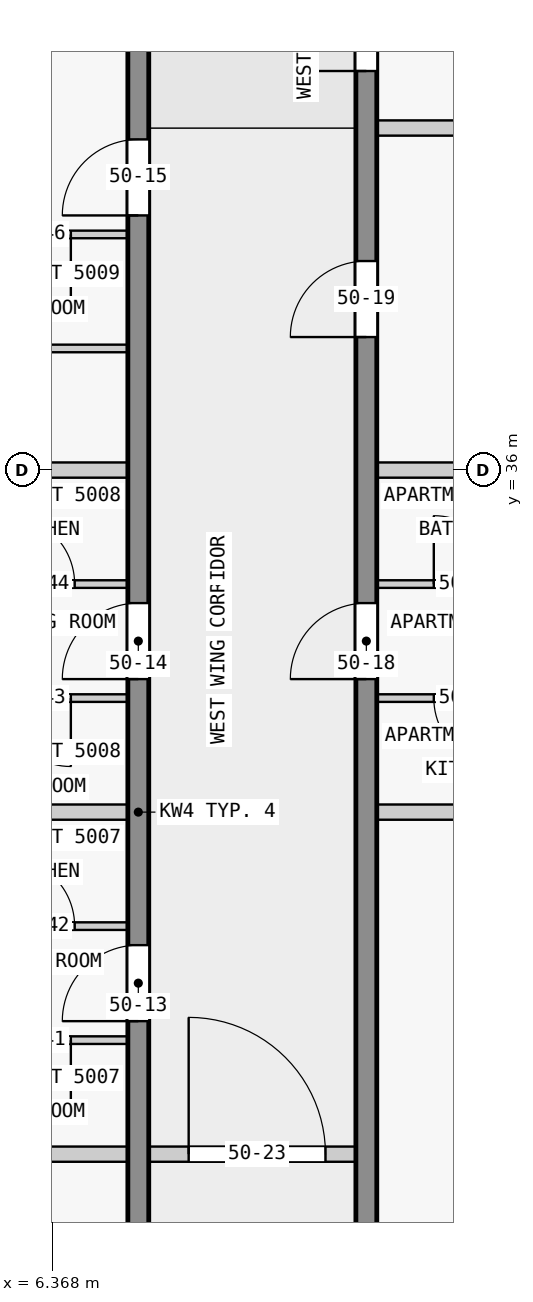
"""IFC4 building model, lengths in metres.
Left out: names, types, materials, properties, quantities, classifications, styles, units other than length and angle.
Written with IfcOpenShell. Run it as: python <this file> out.ifc"""

import sys

from ifc_helpers import new_model, si_unit, direction, frame, frame_2d, origin, place, context, subcontext, project, spatial, rectangle, extrude, element, fill, save


model = new_model("IFC4")
c1 = context("Model", 3, precision=1e-05, world=origin(), true_north=direction((0.0, 1.0)))
c2 = subcontext(c1, "Body", "Model", "MODEL_VIEW")
j1 = project(units=[si_unit("LENGTHUNIT", "METRE"), si_unit("PLANEANGLEUNIT", "RADIAN")], contexts=[c1])
p1 = place(None, origin())
s1 = spatial("IfcSite", under=j1, at=p1, CompositionType="ELEMENT")
p2 = place(p1, origin())
s2 = spatial("IfcBuilding", under=s1, at=p2, CompositionType="ELEMENT")
p3 = place(p2, frame((0.0, 0.0, 194.4)))
s3 = spatial("IfcBuildingStorey", under=s2, at=p3, CompositionType="ELEMENT", Elevation=194.4)
p4 = place(p3, frame((7.5, 18.0, 0.0), z_axis=(0.0, 0.0, 1.0), x_axis=(0.0, 1.0, 0.0)))
e1 = element("IfcWall", 1, at=p4, inside=s3, PredefinedType="SHEAR", context=c2, shape_type="SweptSolid", body=[
    extrude(rectangle(XDim=27.0, YDim=0.275, at=frame_2d((13.5, 0.0))), origin(), (0.0, 0.0, 1.0), 3.25),
])
p5 = place(p4, frame((1.75, 0.0, 0.0)))
e2 = element("IfcOpeningElement", 2, at=p5, cuts=e1, PredefinedType="OPENING", context=c2, shape_type="SweptSolid", body=[
    extrude(rectangle(XDim=1.0, YDim=2.1, at=frame_2d((0.5, 1.05))), frame((0.0, 0.147, 0.0), z_axis=(0.0, -1.0, 0.0), x_axis=(1.0, 0.0, 0.0)), (0.0, 0.0, 1.0), 0.295),
])
p6 = place(p4, frame((5.85, 0.0, 0.0)))
e3 = element("IfcOpeningElement", 3, at=p6, cuts=e1, PredefinedType="OPENING", context=c2, shape_type="SweptSolid", body=[
    extrude(rectangle(XDim=1.8, YDim=2.1, at=frame_2d((0.9, 1.05))), frame((0.0, 0.147, 0.0), z_axis=(0.0, -1.0, 0.0), x_axis=(1.0, 0.0, 0.0)), (0.0, 0.0, 1.0), 0.295),
])
p7 = place(p4, frame((10.75, 0.0, 0.0)))
e4 = element("IfcOpeningElement", 4, at=p7, cuts=e1, PredefinedType="OPENING", context=c2, shape_type="SweptSolid", body=[
    extrude(rectangle(XDim=1.0, YDim=2.1, at=frame_2d((0.5, 1.05))), frame((0.0, 0.147, 0.0), z_axis=(0.0, -1.0, 0.0), x_axis=(1.0, 0.0, 0.0)), (0.0, 0.0, 1.0), 0.295),
])
p8 = place(p4, frame((15.25, 0.0, 0.0)))
e5 = element("IfcOpeningElement", 5, at=p8, cuts=e1, PredefinedType="OPENING", context=c2, shape_type="SweptSolid", body=[
    extrude(rectangle(XDim=1.0, YDim=2.1, at=frame_2d((0.5, 1.05))), frame((0.0, 0.147, 0.0), z_axis=(0.0, -1.0, 0.0), x_axis=(1.0, 0.0, 0.0)), (0.0, 0.0, 1.0), 0.295),
])
p9 = place(p4, frame((21.35, 0.0, 0.0)))
e6 = element("IfcOpeningElement", 6, at=p9, cuts=e1, PredefinedType="OPENING", context=c2, shape_type="SweptSolid", body=[
    extrude(rectangle(XDim=1.0, YDim=2.1, at=frame_2d((0.5, 1.05))), frame((0.0, 0.147, 0.0), z_axis=(0.0, -1.0, 0.0), x_axis=(1.0, 0.0, 0.0)), (0.0, 0.0, 1.0), 0.295),
])
p10 = place(p3, frame((10.5, 18.0, 0.0), z_axis=(0.0, 0.0, 1.0), x_axis=(0.0, 1.0, 0.0)))
e7 = element("IfcWall", 7, at=p10, inside=s3, PredefinedType="SHEAR", context=c2, shape_type="SweptSolid", body=[
    extrude(rectangle(XDim=27.0, YDim=0.275, at=frame_2d((13.5, 0.0))), origin(), (0.0, 0.0, 1.0), 3.25),
])
p11 = place(p10, frame((1.75, 0.0, 0.0)))
e8 = element("IfcOpeningElement", 8, at=p11, cuts=e7, PredefinedType="OPENING", context=c2, shape_type="SweptSolid", body=[
    extrude(rectangle(XDim=1.0, YDim=2.1, at=frame_2d((0.5, 1.05))), frame((0.0, 0.147, 0.0), z_axis=(0.0, -1.0, 0.0), x_axis=(1.0, 0.0, 0.0)), (0.0, 0.0, 1.0), 0.295),
])
p12 = place(p10, frame((6.25, 0.0, 0.0)))
e9 = element("IfcOpeningElement", 9, at=p12, cuts=e7, PredefinedType="OPENING", context=c2, shape_type="SweptSolid", body=[
    extrude(rectangle(XDim=1.0, YDim=2.1, at=frame_2d((0.5, 1.05))), frame((0.0, 0.147, 0.0), z_axis=(0.0, -1.0, 0.0), x_axis=(1.0, 0.0, 0.0)), (0.0, 0.0, 1.0), 0.295),
])
p13 = place(p10, frame((15.25, 0.0, 0.0)))
e10 = element("IfcOpeningElement", 10, at=p13, cuts=e7, PredefinedType="OPENING", context=c2, shape_type="SweptSolid", body=[
    extrude(rectangle(XDim=1.0, YDim=2.1, at=frame_2d((0.5, 1.05))), frame((0.0, 0.147, 0.0), z_axis=(0.0, -1.0, 0.0), x_axis=(1.0, 0.0, 0.0)), (0.0, 0.0, 1.0), 0.295),
])
p14 = place(p10, frame((19.75, 0.0, 0.0)))
e11 = element("IfcOpeningElement", 11, at=p14, cuts=e7, PredefinedType="OPENING", context=c2, shape_type="SweptSolid", body=[
    extrude(rectangle(XDim=1.0, YDim=2.1, at=frame_2d((0.5, 1.05))), frame((0.0, 0.147, 0.0), z_axis=(0.0, -1.0, 0.0), x_axis=(1.0, 0.0, 0.0)), (0.0, 0.0, 1.0), 0.295),
])
p15 = place(p10, frame((23.25, 0.0, 0.0)))
e12 = element("IfcOpeningElement", 12, at=p15, cuts=e7, PredefinedType="OPENING", context=c2, shape_type="SweptSolid", body=[
    extrude(rectangle(XDim=0.9, YDim=2.1, at=frame_2d((0.45, 1.05))), frame((0.0, 0.147, 0.0), z_axis=(0.0, -1.0, 0.0), x_axis=(1.0, 0.0, 0.0)), (0.0, 0.0, 1.0), 0.295),
])
p16 = place(p10, frame((25.45, 0.0, 0.0)))
e13 = element("IfcOpeningElement", 13, at=p16, cuts=e7, PredefinedType="OPENING", context=c2, shape_type="SweptSolid", body=[
    extrude(rectangle(XDim=1.0, YDim=2.1, at=frame_2d((0.5, 1.05))), frame((0.0, 0.147, 0.0), z_axis=(0.0, -1.0, 0.0), x_axis=(1.0, 0.0, 0.0)), (0.0, 0.0, 1.0), 0.295),
])
p17 = place(p3, frame((7.363, 27.0, 0.0), z_axis=(0.0, 0.0, 1.0), x_axis=(-1.0, 0.0, 0.0)))
e14 = element("IfcWall", 14, at=p17, inside=s3, PredefinedType="PARTITIONING", context=c2, shape_type="SweptSolid", body=[
    extrude(rectangle(XDim=7.443, YDim=0.2, at=frame_2d((3.721, 0.0))), origin(), (0.0, 0.0, 1.0), 3.25),
])
p18 = place(p3, frame((7.363, 28.5, 0.0), z_axis=(0.0, 0.0, 1.0), x_axis=(-1.0, 0.0, 0.0)))
e15 = element("IfcWall", 15, at=p18, inside=s3, PredefinedType="PARTITIONING", context=c2, shape_type="SweptSolid", body=[
    extrude(rectangle(XDim=2.4, YDim=0.1, at=frame_2d((1.2, 0.0))), origin(), (0.0, 0.0, 1.0), 3.25),
])
p19 = place(p18, frame((0.75, 0.0, 0.0)))
e16 = element("IfcOpeningElement", 16, at=p19, cuts=e15, PredefinedType="OPENING", context=c2, shape_type="SweptSolid", body=[
    extrude(rectangle(XDim=0.9, YDim=2.1, at=frame_2d((0.45, 1.05))), frame((0.0, 0.06, 0.0), z_axis=(0.0, -1.0, 0.0), x_axis=(1.0, 0.0, 0.0)), (0.0, 0.0, 1.0), 0.12),
])
p20 = place(p3, frame((5.012, 30.0, 0.0), z_axis=(0.0, 0.0, 1.0), x_axis=(1.0, 0.0, 0.0)))
e17 = element("IfcWall", 17, at=p20, inside=s3, PredefinedType="PARTITIONING", context=c2, shape_type="SweptSolid", body=[
    extrude(rectangle(XDim=2.35, YDim=0.1, at=frame_2d((1.175, 0.0))), origin(), (0.0, 0.0, 1.0), 3.25),
])
p21 = place(p20, frame((0.75, 0.0, 0.0)))
e18 = element("IfcOpeningElement", 18, at=p21, cuts=e17, PredefinedType="OPENING", context=c2, shape_type="SweptSolid", body=[
    extrude(rectangle(XDim=0.9, YDim=2.1, at=frame_2d((0.45, 1.05))), frame((0.0, 0.06, 0.0), z_axis=(0.0, -1.0, 0.0), x_axis=(1.0, 0.0, 0.0)), (0.0, 0.0, 1.0), 0.12),
])
p22 = place(p3, frame((7.363, 31.5, 0.0), z_axis=(0.0, 0.0, 1.0), x_axis=(-1.0, 0.0, 0.0)))
e19 = element("IfcWall", 19, at=p22, inside=s3, PredefinedType="PARTITIONING", context=c2, shape_type="SweptSolid", body=[
    extrude(rectangle(XDim=2.3, YDim=0.2, at=frame_2d((1.15, 0.0))), origin(), (0.0, 0.0, 1.0), 3.25),
])
p23 = place(p3, frame((17.85, 31.5, 0.0), z_axis=(0.0, 0.0, 1.0), x_axis=(-1.0, 0.0, 0.0)))
e20 = element("IfcWall", 20, at=p23, inside=s3, PredefinedType="PARTITIONING", context=c2, shape_type="SweptSolid", body=[
    extrude(rectangle(XDim=7.213, YDim=0.2, at=frame_2d((3.606, 0.0))), origin(), (0.0, 0.0, 1.0), 3.25),
])
p24 = place(p3, frame((7.363, 33.0, 0.0), z_axis=(0.0, 0.0, 1.0), x_axis=(-1.0, 0.0, 0.0)))
e21 = element("IfcWall", 21, at=p24, inside=s3, PredefinedType="PARTITIONING", context=c2, shape_type="SweptSolid", body=[
    extrude(rectangle(XDim=2.35, YDim=0.1, at=frame_2d((1.175, 0.0))), origin(), (0.0, 0.0, 1.0), 3.25),
])
p25 = place(p24, frame((0.75, 0.0, 0.0)))
e22 = element("IfcOpeningElement", 22, at=p25, cuts=e21, PredefinedType="OPENING", context=c2, shape_type="SweptSolid", body=[
    extrude(rectangle(XDim=0.9, YDim=2.1, at=frame_2d((0.45, 1.05))), frame((0.0, 0.06, 0.0), z_axis=(0.0, -1.0, 0.0), x_axis=(1.0, 0.0, 0.0)), (0.0, 0.0, 1.0), 0.12),
])
p26 = place(p3, frame((13.038, 33.0, 0.0), z_axis=(0.0, 0.0, 1.0), x_axis=(-1.0, 0.0, 0.0)))
e23 = element("IfcWall", 23, at=p26, inside=s3, PredefinedType="PARTITIONING", context=c2, shape_type="SweptSolid", body=[
    extrude(rectangle(XDim=2.4, YDim=0.1, at=frame_2d((1.2, 0.0))), origin(), (0.0, 0.0, 1.0), 3.25),
])
p27 = place(p26, frame((0.75, 0.0, 0.0)))
e24 = element("IfcOpeningElement", 24, at=p27, cuts=e23, PredefinedType="OPENING", context=c2, shape_type="SweptSolid", body=[
    extrude(rectangle(XDim=0.9, YDim=2.1, at=frame_2d((0.45, 1.05))), frame((0.0, 0.06, 0.0), z_axis=(0.0, -1.0, 0.0), x_axis=(1.0, 0.0, 0.0)), (0.0, 0.0, 1.0), 0.12),
])
p28 = place(p3, frame((5.012, 34.5, 0.0), z_axis=(0.0, 0.0, 1.0), x_axis=(1.0, 0.0, 0.0)))
e25 = element("IfcWall", 25, at=p28, inside=s3, PredefinedType="PARTITIONING", context=c2, shape_type="SweptSolid", body=[
    extrude(rectangle(XDim=2.35, YDim=0.1, at=frame_2d((1.175, 0.0))), origin(), (0.0, 0.0, 1.0), 3.25),
])
p29 = place(p28, frame((0.75, 0.0, 0.0)))
e26 = element("IfcOpeningElement", 26, at=p29, cuts=e25, PredefinedType="OPENING", context=c2, shape_type="SweptSolid", body=[
    extrude(rectangle(XDim=0.9, YDim=2.1, at=frame_2d((0.45, 1.05))), frame((0.0, 0.06, 0.0), z_axis=(0.0, -1.0, 0.0), x_axis=(1.0, 0.0, 0.0)), (0.0, 0.0, 1.0), 0.12),
])
p30 = place(p3, frame((10.637, 34.5, 0.0), z_axis=(0.0, 0.0, 1.0), x_axis=(1.0, 0.0, 0.0)))
e27 = element("IfcWall", 27, at=p30, inside=s3, PredefinedType="PARTITIONING", context=c2, shape_type="SweptSolid", body=[
    extrude(rectangle(XDim=2.4, YDim=0.1, at=frame_2d((1.2, 0.0))), origin(), (0.0, 0.0, 1.0), 3.25),
])
p31 = place(p30, frame((0.75, 0.0, 0.0)))
e28 = element("IfcOpeningElement", 28, at=p31, cuts=e27, PredefinedType="OPENING", context=c2, shape_type="SweptSolid", body=[
    extrude(rectangle(XDim=0.9, YDim=2.1, at=frame_2d((0.45, 1.05))), frame((0.0, 0.06, 0.0), z_axis=(0.0, -1.0, 0.0), x_axis=(1.0, 0.0, 0.0)), (0.0, 0.0, 1.0), 0.12),
])
for number, where, z_axis, x_axis in (
    (29, (7.363, 36.0, 0.0), (0.0, 0.0, 1.0), (-1.0, 0.0, 0.0)),
    (30, (12.938, 36.0, 0.0), (0.0, 0.0, 1.0), (-1.0, 0.0, 0.0)),
):
    element("IfcWall", number, at=place(p3, frame(where, z_axis=z_axis, x_axis=x_axis)), inside=s3, PredefinedType="PARTITIONING", context=c2, shape_type="SweptSolid", body=[
        extrude(rectangle(XDim=2.3, YDim=0.2, at=frame_2d((1.15, 0.0))), origin(), (0.0, 0.0, 1.0), 3.25),
    ])
p32 = place(p3, frame((7.363, 37.6, 0.0), z_axis=(0.0, 0.0, 1.0), x_axis=(-1.0, 0.0, 0.0)))
e31 = element("IfcWall", 31, at=p32, inside=s3, PredefinedType="PARTITIONING", context=c2, shape_type="SweptSolid", body=[
    extrude(rectangle(XDim=2.35, YDim=0.1, at=frame_2d((1.175, 0.0))), origin(), (0.0, 0.0, 1.0), 3.25),
])
p33 = place(p3, frame((7.363, 39.1, 0.0), z_axis=(0.0, 0.0, 1.0), x_axis=(-1.0, 0.0, 0.0)))
e32 = element("IfcWall", 32, at=p33, inside=s3, PredefinedType="PARTITIONING", context=c2, shape_type="SweptSolid", body=[
    extrude(rectangle(XDim=2.35, YDim=0.1, at=frame_2d((1.175, 0.0))), origin(), (0.0, 0.0, 1.0), 3.25),
])
p34 = place(p33, frame((0.75, 0.0, 0.0)))
e33 = element("IfcOpeningElement", 33, at=p34, cuts=e32, PredefinedType="OPENING", context=c2, shape_type="SweptSolid", body=[
    extrude(rectangle(XDim=0.9, YDim=2.1, at=frame_2d((0.45, 1.05))), frame((0.0, 0.06, 0.0), z_axis=(0.0, -1.0, 0.0), x_axis=(1.0, 0.0, 0.0)), (0.0, 0.0, 1.0), 0.12),
])
p35 = place(p3, frame((18.08, 40.5, 0.0), z_axis=(0.0, 0.0, 1.0), x_axis=(-1.0, 0.0, 0.0)))
e34 = element("IfcWall", 34, at=p35, inside=s3, PredefinedType="PARTITIONING", context=c2, shape_type="SweptSolid", body=[
    extrude(rectangle(XDim=7.443, YDim=0.2, at=frame_2d((3.721, 0.0))), origin(), (0.0, 0.0, 1.0), 3.25),
])
p36 = place(p3, frame((7.462, 27.0, 0.0), z_axis=(0.0, 0.0, 1.0), x_axis=(1.0, 0.0, 0.0)))
e35 = element("IfcWall", 35, at=p36, inside=s3, PredefinedType="PARTITIONING", context=c2, shape_type="SweptSolid", body=[
    extrude(rectangle(XDim=3.175, YDim=0.2, at=frame_2d((1.587, 0.0))), origin(), (0.0, 0.0, 1.0), 3.25),
])
p37 = place(p36, frame((0.7, 0.0, 0.0)))
e36 = element("IfcOpeningElement", 36, at=p37, cuts=e35, PredefinedType="OPENING", context=c2, shape_type="SweptSolid", body=[
    extrude(rectangle(XDim=1.8, YDim=2.1, at=frame_2d((0.9, 1.05))), frame((0.0, 0.11, 0.0), z_axis=(0.0, -1.0, 0.0), x_axis=(1.0, 0.0, 0.0)), (0.0, 0.0, 1.0), 0.22),
])
p38 = place(p7, origin())
e37 = element("IfcDoor", 37, at=p38, inside=s3, OperationType="SINGLE_SWING_LEFT", PredefinedType="DOOR", context=c2, shape_type="SweptSolid", body=[
    extrude(rectangle(XDim=1.0, YDim=2.1, at=frame_2d((0.5, 1.05))), frame((0.0, 0.025, 0.0), z_axis=(0.0, -1.0, 0.0), x_axis=(1.0, 0.0, 0.0)), (0.0, 0.0, 1.0), 0.05),
])
fill(e4, e37)
p39 = place(p8, origin())
e38 = element("IfcDoor", 38, at=p39, inside=s3, OperationType="SINGLE_SWING_RIGHT", PredefinedType="DOOR", context=c2, shape_type="SweptSolid", body=[
    extrude(rectangle(XDim=1.0, YDim=2.1, at=frame_2d((0.5, 1.05))), frame((0.0, 0.025, 0.0), z_axis=(0.0, -1.0, 0.0), x_axis=(1.0, 0.0, 0.0)), (0.0, 0.0, 1.0), 0.05),
])
fill(e5, e38)
p40 = place(p9, origin())
e39 = element("IfcDoor", 39, at=p40, inside=s3, OperationType="SINGLE_SWING_RIGHT", PredefinedType="DOOR", context=c2, shape_type="SweptSolid", body=[
    extrude(rectangle(XDim=1.0, YDim=2.1, at=frame_2d((0.5, 1.05))), frame((0.0, 0.025, 0.0), z_axis=(0.0, -1.0, 0.0), x_axis=(1.0, 0.0, 0.0)), (0.0, 0.0, 1.0), 0.05),
])
fill(e6, e39)
p41 = place(p13, origin())
e40 = element("IfcDoor", 40, at=p41, inside=s3, OperationType="SINGLE_SWING_RIGHT", PredefinedType="DOOR", context=c2, shape_type="SweptSolid", body=[
    extrude(rectangle(XDim=1.0, YDim=2.1, at=frame_2d((0.5, 1.05))), frame((0.0, 0.025, 0.0), z_axis=(0.0, -1.0, 0.0), x_axis=(1.0, 0.0, 0.0)), (0.0, 0.0, 1.0), 0.05),
])
fill(e10, e40)
p42 = place(p14, origin())
e41 = element("IfcDoor", 41, at=p42, inside=s3, OperationType="SINGLE_SWING_RIGHT", PredefinedType="DOOR", context=c2, shape_type="SweptSolid", body=[
    extrude(rectangle(XDim=1.0, YDim=2.1, at=frame_2d((0.5, 1.05))), frame((0.0, 0.025, 0.0), z_axis=(0.0, -1.0, 0.0), x_axis=(1.0, 0.0, 0.0)), (0.0, 0.0, 1.0), 0.05),
])
fill(e11, e41)
p43 = place(p15, origin())
e42 = element("IfcDoor", 42, at=p43, inside=s3, OperationType="SINGLE_SWING_RIGHT", PredefinedType="DOOR", context=c2, shape_type="SweptSolid", body=[
    extrude(rectangle(XDim=0.9, YDim=2.1, at=frame_2d((0.45, 1.05))), frame((0.0, 0.025, 0.0), z_axis=(0.0, -1.0, 0.0), x_axis=(1.0, 0.0, 0.0)), (0.0, 0.0, 1.0), 0.05),
])
fill(e12, e42)
p44 = place(p37, origin())
e43 = element("IfcDoor", 43, at=p44, inside=s3, OperationType="SINGLE_SWING_RIGHT", PredefinedType="DOOR", context=c2, shape_type="SweptSolid", body=[
    extrude(rectangle(XDim=1.8, YDim=2.1, at=frame_2d((0.9, 1.05))), frame((0.0, 0.025, 0.0), z_axis=(0.0, -1.0, 0.0), x_axis=(1.0, 0.0, 0.0)), (0.0, 0.0, 1.0), 0.05),
])
fill(e36, e43)
p45 = place(p19, origin())
e44 = element("IfcDoor", 44, at=p45, inside=s3, OperationType="SINGLE_SWING_RIGHT", PredefinedType="DOOR", context=c2, shape_type="SweptSolid", body=[
    extrude(rectangle(XDim=0.9, YDim=2.1, at=frame_2d((0.45, 1.05))), frame((0.0, 0.025, 0.0), z_axis=(0.0, -1.0, 0.0), x_axis=(1.0, 0.0, 0.0)), (0.0, 0.0, 1.0), 0.05),
])
fill(e16, e44)
p46 = place(p21, origin())
e45 = element("IfcDoor", 45, at=p46, inside=s3, OperationType="SINGLE_SWING_RIGHT", PredefinedType="DOOR", context=c2, shape_type="SweptSolid", body=[
    extrude(rectangle(XDim=0.9, YDim=2.1, at=frame_2d((0.45, 1.05))), frame((0.0, 0.025, 0.0), z_axis=(0.0, -1.0, 0.0), x_axis=(1.0, 0.0, 0.0)), (0.0, 0.0, 1.0), 0.05),
])
fill(e18, e45)
p47 = place(p25, origin())
e46 = element("IfcDoor", 46, at=p47, inside=s3, OperationType="SINGLE_SWING_RIGHT", PredefinedType="DOOR", context=c2, shape_type="SweptSolid", body=[
    extrude(rectangle(XDim=0.9, YDim=2.1, at=frame_2d((0.45, 1.05))), frame((0.0, 0.025, 0.0), z_axis=(0.0, -1.0, 0.0), x_axis=(1.0, 0.0, 0.0)), (0.0, 0.0, 1.0), 0.05),
])
fill(e22, e46)
p48 = place(p29, origin())
e47 = element("IfcDoor", 47, at=p48, inside=s3, OperationType="SINGLE_SWING_RIGHT", PredefinedType="DOOR", context=c2, shape_type="SweptSolid", body=[
    extrude(rectangle(XDim=0.9, YDim=2.1, at=frame_2d((0.45, 1.05))), frame((0.0, 0.025, 0.0), z_axis=(0.0, -1.0, 0.0), x_axis=(1.0, 0.0, 0.0)), (0.0, 0.0, 1.0), 0.05),
])
fill(e26, e47)
p49 = place(p34, origin())
e48 = element("IfcDoor", 48, at=p49, inside=s3, OperationType="SINGLE_SWING_RIGHT", PredefinedType="DOOR", context=c2, shape_type="SweptSolid", body=[
    extrude(rectangle(XDim=0.9, YDim=2.1, at=frame_2d((0.45, 1.05))), frame((0.0, 0.025, 0.0), z_axis=(0.0, -1.0, 0.0), x_axis=(1.0, 0.0, 0.0)), (0.0, 0.0, 1.0), 0.05),
])
fill(e33, e48)
p50 = place(p27, origin())
e49 = element("IfcDoor", 49, at=p50, inside=s3, OperationType="SINGLE_SWING_LEFT", PredefinedType="DOOR", context=c2, shape_type="SweptSolid", body=[
    extrude(rectangle(XDim=0.9, YDim=2.1, at=frame_2d((0.45, 1.05))), frame((0.0, 0.025, 0.0), z_axis=(0.0, -1.0, 0.0), x_axis=(1.0, 0.0, 0.0)), (0.0, 0.0, 1.0), 0.05),
])
fill(e24, e49)
p51 = place(p31, origin())
e50 = element("IfcDoor", 50, at=p51, inside=s3, OperationType="SINGLE_SWING_LEFT", PredefinedType="DOOR", context=c2, shape_type="SweptSolid", body=[
    extrude(rectangle(XDim=0.9, YDim=2.1, at=frame_2d((0.45, 1.05))), frame((0.0, 0.025, 0.0), z_axis=(0.0, -1.0, 0.0), x_axis=(1.0, 0.0, 0.0)), (0.0, 0.0, 1.0), 0.05),
])
fill(e28, e50)
save(model, sys.argv[1])
